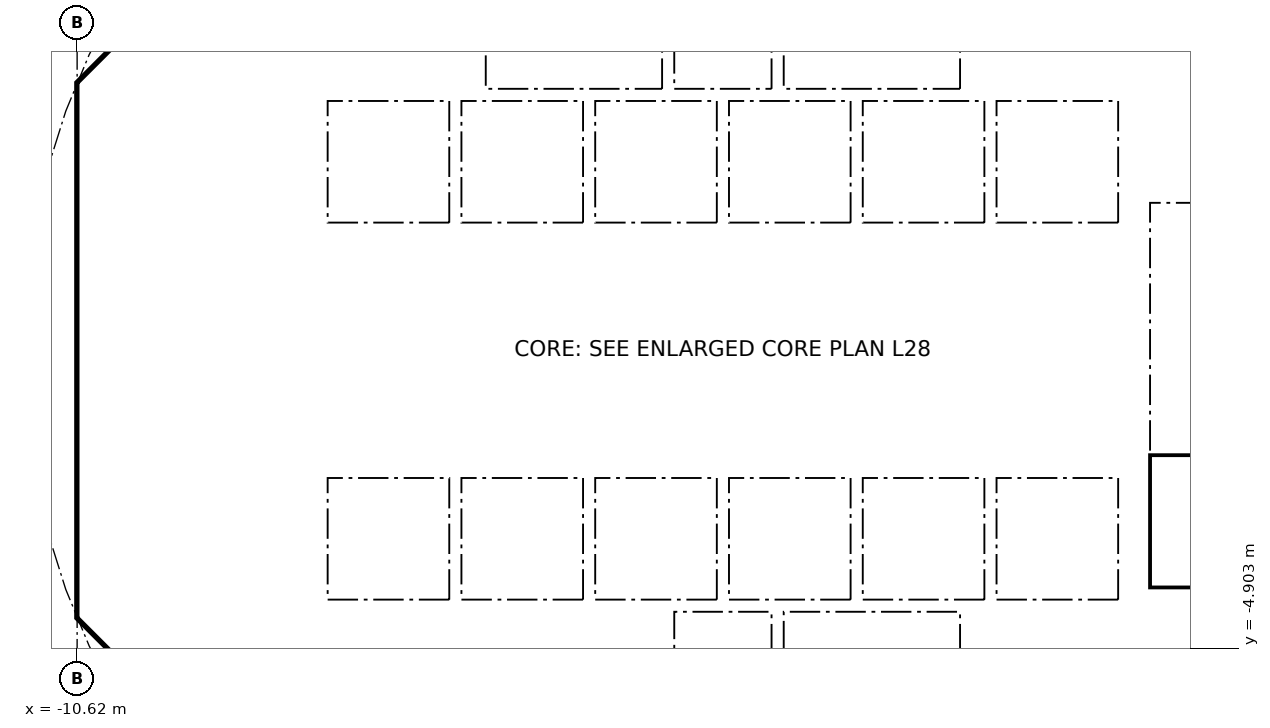
"""IFC4 building model, lengths in metres.
Left out: names, types, materials, properties, quantities, classifications, styles, units other than length and angle.
Written with IfcOpenShell. Run it as: python <this file> out.ifc"""

import sys

from ifc_helpers import new_model, si_unit, direction, frame, frame_2d, origin, place, context, subcontext, project, spatial, polyline, rectangle, outline, extrude, element, fill, save


model = new_model("IFC4")
c1 = context("Model", 3, precision=1e-05, world=origin(), true_north=direction((0.0, 1.0)))
c2 = subcontext(c1, "Body", "Model", "MODEL_VIEW")
j1 = project(units=[si_unit("LENGTHUNIT", "METRE"), si_unit("PLANEANGLEUNIT", "RADIAN")], contexts=[c1])
p1 = place(None, origin())
s1 = spatial("IfcSite", under=j1, at=p1, CompositionType="ELEMENT")
p2 = place(p1, origin())
s2 = spatial("IfcBuilding", under=s1, at=p2, CompositionType="ELEMENT")
p3 = place(p2, frame((0.0, 0.0, 114.0)))
s3 = spatial("IfcBuildingStorey", under=s2, at=p3, CompositionType="ELEMENT", Elevation=114.0)
p4 = place(p3, frame((9.988, 4.613, 0.0), z_axis=(0.0, 0.0, 1.0), x_axis=(-0.707106781187, 0.707106781187, 0.0)))
e1 = element("IfcWall", 1, at=p4, inside=s3, PredefinedType="SHEAR", context=c2, shape_type="SweptSolid", body=[
    extrude(rectangle(XDim=7.602, YDim=0.6, at=frame_2d((3.801, 0.0))), origin(), (0.0, 0.0, 1.0), 5.34),
])
p5 = place(p4, frame((3.201, 0.0, 0.0)))
e2 = element("IfcOpeningElement", 2, at=p5, cuts=e1, PredefinedType="OPENING", context=c2, shape_type="SweptSolid", body=[
    extrude(rectangle(XDim=1.2, YDim=2.1, at=frame_2d((0.6, 1.05))), frame((0.0, 0.31, 0.0), z_axis=(0.0, -1.0, 0.0), x_axis=(1.0, 0.0, 0.0)), (0.0, 0.0, 1.0), 0.62),
])
p6 = place(p3, frame((-4.613, 9.988, 0.0), z_axis=(0.0, 0.0, 1.0), x_axis=(-0.707106781187, -0.707106781187, 0.0)))
e3 = element("IfcWall", 3, at=p6, inside=s3, PredefinedType="SHEAR", context=c2, shape_type="SweptSolid", body=[
    extrude(rectangle(XDim=7.602, YDim=0.6, at=frame_2d((3.801, 0.0))), origin(), (0.0, 0.0, 1.0), 5.34),
])
p7 = place(p6, frame((0.351, 0.0, 0.0)))
e4 = element("IfcOpeningElement", 4, at=p7, cuts=e3, PredefinedType="OPENING", context=c2, shape_type="SweptSolid", body=[
    extrude(rectangle(XDim=1.1, YDim=2.1, at=frame_2d((0.55, 1.05))), frame((0.0, 0.31, 0.0), z_axis=(0.0, -1.0, 0.0), x_axis=(1.0, 0.0, 0.0)), (0.0, 0.0, 1.0), 0.62),
])
p8 = place(p3, frame((-10.325, 3.801, 0.0), z_axis=(0.0, 0.0, 1.0), x_axis=(0.0, -1.0, 0.0)))
e5 = element("IfcWall", 5, at=p8, inside=s3, PredefinedType="SHEAR", context=c2, shape_type="SweptSolid", body=[
    extrude(rectangle(XDim=7.602, YDim=0.6, at=frame_2d((3.801, 0.0))), origin(), (0.0, 0.0, 1.0), 5.34),
])
p9 = place(p8, frame((0.651, 0.0, 0.0)))
e6 = element("IfcOpeningElement", 6, at=p9, cuts=e5, PredefinedType="OPENING", context=c2, shape_type="SweptSolid", body=[
    extrude(rectangle(XDim=1.5, YDim=2.1, at=frame_2d((0.75, 1.05))), frame((0.0, 0.31, 0.0), z_axis=(0.0, -1.0, 0.0), x_axis=(1.0, 0.0, 0.0)), (0.0, 0.0, 1.0), 0.62),
])
p10 = place(p8, frame((5.451, 0.0, 0.0)))
e7 = element("IfcOpeningElement", 7, at=p10, cuts=e5, PredefinedType="OPENING", context=c2, shape_type="SweptSolid", body=[
    extrude(rectangle(XDim=1.5, YDim=2.1, at=frame_2d((0.75, 1.05))), frame((0.0, 0.31, 0.0), z_axis=(0.0, -1.0, 0.0), x_axis=(1.0, 0.0, 0.0)), (0.0, 0.0, 1.0), 0.62),
])
p11 = place(p3, frame((-9.988, -4.613, 0.0), z_axis=(0.0, 0.0, 1.0), x_axis=(0.707106781187, -0.707106781187, 0.0)))
e8 = element("IfcWall", 8, at=p11, inside=s3, PredefinedType="SHEAR", context=c2, shape_type="SweptSolid", body=[
    extrude(rectangle(XDim=7.602, YDim=0.6, at=frame_2d((3.801, 0.0))), origin(), (0.0, 0.0, 1.0), 5.34),
])
p12 = place(p11, frame((6.151, 0.0, 0.0)))
e9 = element("IfcOpeningElement", 9, at=p12, cuts=e8, PredefinedType="OPENING", context=c2, shape_type="SweptSolid", body=[
    extrude(rectangle(XDim=1.1, YDim=2.1, at=frame_2d((0.55, 1.05))), frame((0.0, 0.31, 0.0), z_axis=(0.0, -1.0, 0.0), x_axis=(1.0, 0.0, 0.0)), (0.0, 0.0, 1.0), 0.62),
])
p13 = place(p3, frame((4.613, -9.988, 0.0), z_axis=(0.0, 0.0, 1.0), x_axis=(0.707106781187, 0.707106781187, 0.0)))
e10 = element("IfcWall", 10, at=p13, inside=s3, PredefinedType="SHEAR", context=c2, shape_type="SweptSolid", body=[
    extrude(rectangle(XDim=7.602, YDim=0.6, at=frame_2d((3.801, 0.0))), origin(), (0.0, 0.0, 1.0), 5.34),
])
p14 = place(p13, frame((3.201, 0.0, 0.0)))
e11 = element("IfcOpeningElement", 11, at=p14, cuts=e10, PredefinedType="OPENING", context=c2, shape_type="SweptSolid", body=[
    extrude(rectangle(XDim=1.2, YDim=2.1, at=frame_2d((0.6, 1.05))), frame((0.0, 0.31, 0.0), z_axis=(0.0, -1.0, 0.0), x_axis=(1.0, 0.0, 0.0)), (0.0, 0.0, 1.0), 0.62),
])
p15 = place(p3, frame((-5.8, 4.3, 0.0), z_axis=(0.0, 0.0, 1.0), x_axis=(0.0, 1.0, 0.0)))
e12 = element("IfcWall", 12, at=p15, inside=s3, PredefinedType="PARTITIONING", context=c2, shape_type="SweptSolid", body=[
    extrude(rectangle(XDim=3.927, YDim=0.15, at=frame_2d((1.963, 0.0))), origin(), (0.0, 0.0, 1.0), 5.34),
])
p16 = place(p15, frame((1.551, 0.0, 0.0)))
e13 = element("IfcOpeningElement", 13, at=p16, cuts=e12, PredefinedType="OPENING", context=c2, shape_type="SweptSolid", body=[
    extrude(rectangle(XDim=0.9, YDim=2.1, at=frame_2d((0.45, 1.05))), frame((0.0, 0.085, 0.0), z_axis=(0.0, -1.0, 0.0), x_axis=(1.0, 0.0, 0.0)), (0.0, 0.0, 1.0), 0.17),
])
p17 = place(p3, frame((4.0, 4.3, 0.0), z_axis=(0.0, 0.0, 1.0), x_axis=(0.0, 1.0, 0.0)))
e14 = element("IfcWall", 14, at=p17, inside=s3, PredefinedType="SOLIDWALL", context=c2, shape_type="SweptSolid", body=[
    extrude(rectangle(XDim=2.2, YDim=0.2, at=frame_2d((1.1, 0.0))), origin(), (0.0, 0.0, 1.0), 5.34),
])
p18 = place(p17, frame((0.55, 0.0, 0.0)))
e15 = element("IfcOpeningElement", 15, at=p18, cuts=e14, PredefinedType="OPENING", context=c2, shape_type="SweptSolid", body=[
    extrude(rectangle(XDim=1.1, YDim=2.1, at=frame_2d((0.55, 1.05))), frame((0.0, 0.11, 0.0), z_axis=(0.0, -1.0, 0.0), x_axis=(1.0, 0.0, 0.0)), (0.0, 0.0, 1.0), 0.22),
])
p19 = place(p3, frame((-4.0, 4.3, 0.0), z_axis=(0.0, 0.0, 1.0), x_axis=(0.0, 1.0, 0.0)))
e16 = element("IfcWall", 16, at=p19, inside=s3, PredefinedType="SOLIDWALL", context=c2, shape_type="SweptSolid", body=[
    extrude(rectangle(XDim=2.2, YDim=0.2, at=frame_2d((1.1, 0.0))), origin(), (0.0, 0.0, 1.0), 5.34),
])
p20 = place(p19, frame((0.55, 0.0, 0.0)))
e17 = element("IfcOpeningElement", 17, at=p20, cuts=e16, PredefinedType="OPENING", context=c2, shape_type="SweptSolid", body=[
    extrude(rectangle(XDim=1.1, YDim=2.1, at=frame_2d((0.55, 1.05))), frame((0.0, 0.11, 0.0), z_axis=(0.0, -1.0, 0.0), x_axis=(1.0, 0.0, 0.0)), (0.0, 0.0, 1.0), 0.22),
])
p21 = place(p3, frame((-6.7, 2.0, 0.0), z_axis=(0.0, 0.0, 1.0), x_axis=(1.0, 0.0, 0.0)))
e18 = element("IfcWall", 18, at=p21, inside=s3, PredefinedType="SOLIDWALL", context=c2, shape_type="SweptSolid", body=[
    extrude(rectangle(XDim=13.4, YDim=0.2, at=frame_2d((6.7, 0.0))), origin(), (0.0, 0.0, 1.0), 5.34),
])
p22 = place(p21, frame((0.65, 0.0, 0.0)))
e19 = element("IfcOpeningElement", 19, at=p22, cuts=e18, PredefinedType="OPENING", context=c2, shape_type="SweptSolid", body=[
    extrude(rectangle(XDim=1.1, YDim=2.1, at=frame_2d((0.55, 1.05))), frame((0.0, 0.11, 0.0), z_axis=(0.0, -1.0, 0.0), x_axis=(1.0, 0.0, 0.0)), (0.0, 0.0, 1.0), 0.22),
])
p23 = place(p21, frame((2.85, 0.0, 0.0)))
e20 = element("IfcOpeningElement", 20, at=p23, cuts=e18, PredefinedType="OPENING", context=c2, shape_type="SweptSolid", body=[
    extrude(rectangle(XDim=1.1, YDim=2.1, at=frame_2d((0.55, 1.05))), frame((0.0, 0.11, 0.0), z_axis=(0.0, -1.0, 0.0), x_axis=(1.0, 0.0, 0.0)), (0.0, 0.0, 1.0), 0.22),
])
p24 = place(p21, frame((5.05, 0.0, 0.0)))
e21 = element("IfcOpeningElement", 21, at=p24, cuts=e18, PredefinedType="OPENING", context=c2, shape_type="SweptSolid", body=[
    extrude(rectangle(XDim=1.1, YDim=2.1, at=frame_2d((0.55, 1.05))), frame((0.0, 0.11, 0.0), z_axis=(0.0, -1.0, 0.0), x_axis=(1.0, 0.0, 0.0)), (0.0, 0.0, 1.0), 0.22),
])
p25 = place(p3, frame((6.7, 4.0, 0.0), z_axis=(0.0, 0.0, 1.0), x_axis=(1.0, 0.0, 0.0)))
e22 = element("IfcWall", 22, at=p25, inside=s3, PredefinedType="SOLIDWALL", context=c2, shape_type="SweptSolid", body=[
    extrude(rectangle(XDim=3.325, YDim=0.2, at=frame_2d((1.662, 0.0))), origin(), (0.0, 0.0, 1.0), 5.34),
])
p26 = place(p25, frame((1.25, 0.0, 0.0)))
e23 = element("IfcOpeningElement", 23, at=p26, cuts=e22, PredefinedType="OPENING", context=c2, shape_type="SweptSolid", body=[
    extrude(rectangle(XDim=1.1, YDim=2.1, at=frame_2d((0.55, 1.05))), frame((0.0, 0.11, 0.0), z_axis=(0.0, -1.0, 0.0), x_axis=(1.0, 0.0, 0.0)), (0.0, 0.0, 1.0), 0.22),
])
p27 = place(p3, frame((-5.8, -8.227, 0.0), z_axis=(0.0, 0.0, 1.0), x_axis=(0.0, 1.0, 0.0)))
e24 = element("IfcWall", 24, at=p27, inside=s3, PredefinedType="PARTITIONING", context=c2, shape_type="SweptSolid", body=[
    extrude(rectangle(XDim=3.927, YDim=0.15, at=frame_2d((1.963, 0.0))), origin(), (0.0, 0.0, 1.0), 5.34),
])
p28 = place(p27, frame((1.476, 0.0, 0.0)))
e25 = element("IfcOpeningElement", 25, at=p28, cuts=e24, PredefinedType="OPENING", context=c2, shape_type="SweptSolid", body=[
    extrude(rectangle(XDim=0.9, YDim=2.1, at=frame_2d((0.45, 1.05))), frame((0.0, 0.085, 0.0), z_axis=(0.0, -1.0, 0.0), x_axis=(1.0, 0.0, 0.0)), (0.0, 0.0, 1.0), 0.17),
])
p29 = place(p3, frame((4.0, -6.5, 0.0), z_axis=(0.0, 0.0, 1.0), x_axis=(0.0, 1.0, 0.0)))
e26 = element("IfcWall", 26, at=p29, inside=s3, PredefinedType="SOLIDWALL", context=c2, shape_type="SweptSolid", body=[
    extrude(rectangle(XDim=2.2, YDim=0.2, at=frame_2d((1.1, 0.0))), origin(), (0.0, 0.0, 1.0), 5.34),
])
p30 = place(p29, frame((0.55, 0.0, 0.0)))
e27 = element("IfcOpeningElement", 27, at=p30, cuts=e26, PredefinedType="OPENING", context=c2, shape_type="SweptSolid", body=[
    extrude(rectangle(XDim=1.1, YDim=2.1, at=frame_2d((0.55, 1.05))), frame((0.0, 0.11, 0.0), z_axis=(0.0, -1.0, 0.0), x_axis=(1.0, 0.0, 0.0)), (0.0, 0.0, 1.0), 0.22),
])
p31 = place(p3, frame((-4.0, -6.5, 0.0), z_axis=(0.0, 0.0, 1.0), x_axis=(0.0, 1.0, 0.0)))
e28 = element("IfcWall", 28, at=p31, inside=s3, PredefinedType="SOLIDWALL", context=c2, shape_type="SweptSolid", body=[
    extrude(rectangle(XDim=2.2, YDim=0.2, at=frame_2d((1.1, 0.0))), origin(), (0.0, 0.0, 1.0), 5.34),
])
p32 = place(p31, frame((0.65, 0.0, 0.0)))
e29 = element("IfcOpeningElement", 29, at=p32, cuts=e28, PredefinedType="OPENING", context=c2, shape_type="SweptSolid", body=[
    extrude(rectangle(XDim=0.9, YDim=2.1, at=frame_2d((0.45, 1.05))), frame((0.0, 0.11, 0.0), z_axis=(0.0, -1.0, 0.0), x_axis=(1.0, 0.0, 0.0)), (0.0, 0.0, 1.0), 0.22),
])
p33 = place(p3, frame((-6.7, -2.0, 0.0), z_axis=(0.0, 0.0, 1.0), x_axis=(1.0, 0.0, 0.0)))
e30 = element("IfcWall", 30, at=p33, inside=s3, PredefinedType="SOLIDWALL", context=c2, shape_type="SweptSolid", body=[
    extrude(rectangle(XDim=13.4, YDim=0.2, at=frame_2d((6.7, 0.0))), origin(), (0.0, 0.0, 1.0), 5.34),
])
p34 = place(p33, frame((0.65, 0.0, 0.0)))
e31 = element("IfcOpeningElement", 31, at=p34, cuts=e30, PredefinedType="OPENING", context=c2, shape_type="SweptSolid", body=[
    extrude(rectangle(XDim=1.1, YDim=2.1, at=frame_2d((0.55, 1.05))), frame((0.0, 0.11, 0.0), z_axis=(0.0, -1.0, 0.0), x_axis=(1.0, 0.0, 0.0)), (0.0, 0.0, 1.0), 0.22),
])
p35 = place(p33, frame((2.85, 0.0, 0.0)))
e32 = element("IfcOpeningElement", 32, at=p35, cuts=e30, PredefinedType="OPENING", context=c2, shape_type="SweptSolid", body=[
    extrude(rectangle(XDim=1.1, YDim=2.1, at=frame_2d((0.55, 1.05))), frame((0.0, 0.11, 0.0), z_axis=(0.0, -1.0, 0.0), x_axis=(1.0, 0.0, 0.0)), (0.0, 0.0, 1.0), 0.22),
])
p36 = place(p3, origin())
e33 = element("IfcWall", 33, at=p36, inside=s3, PredefinedType="SHEAR", context=c2, shape_type="SweptSolid", body=[
    extrude(outline(polyline([(-10.625, -3.801), (-10.025, -3.801), (-10.025, -4.152), (-9.776, -4.401), (-10.2, -4.825), (-10.625, -4.401), (-10.625, -3.801)])), origin(), (0.0, 0.0, 1.0), 5.34),
])
p37 = place(p3, origin())
e34 = element("IfcWall", 34, at=p37, inside=s3, PredefinedType="SHEAR", context=c2, shape_type="SweptSolid", body=[
    extrude(outline(polyline([(-10.2, 4.825), (-9.776, 4.401), (-10.025, 4.152), (-10.025, 3.801), (-10.625, 3.801), (-10.625, 4.401), (-10.2, 4.825)])), origin(), (0.0, 0.0, 1.0), 5.34),
])
for number, where, z_axis, x_axis in (
    (35, (-0.9, -6.5, 0.0), (0.0, 0.0, 1.0), (0.0, 1.0, 0.0)),
    (36, (0.9, -6.5, 0.0), (0.0, 0.0, 1.0), (0.0, 1.0, 0.0)),
):
    element("IfcWall", number, at=place(p3, frame(where, z_axis=z_axis, x_axis=x_axis)), inside=s3, PredefinedType="SOLIDWALL", context=c2, shape_type="SweptSolid", body=[
        extrude(rectangle(XDim=2.2, YDim=0.2, at=frame_2d((1.1, 0.0))), origin(), (0.0, 0.0, 1.0), 5.34),
    ])
p38 = place(p3, origin())
e37 = element("IfcWall", 37, at=p38, inside=s3, PredefinedType="SOLIDWALL", context=c2, shape_type="SweptSolid", body=[
    extrude(outline(polyline([(-6.7, -2.1), (-6.5, -2.1), (-6.5, -4.1), (-4.5, -4.1), (-4.5, -2.1), (-4.3, -2.1), (-4.3, -4.1), (-2.3, -4.1), (-2.3, -2.1), (-2.1, -2.1), (-2.1, -4.1), (-0.1, -4.1), (-0.1, -2.1), (0.1, -2.1), (0.1, -4.1), (2.1, -4.1), (2.1, -2.1), (2.3, -2.1), (2.3, -4.1), (4.3, -4.1), (4.3, -2.1), (4.5, -2.1), (4.5, -4.1), (6.5, -4.1), (6.5, -2.1), (6.7, -2.1), (6.7, -4.3), (-6.7, -4.3), (-6.7, -2.1)])), origin(), (0.0, 0.0, 1.0), 5.34),
])
for number, where, z_axis, x_axis in (
    (38, (-0.9, 4.3, 0.0), (0.0, 0.0, 1.0), (0.0, 1.0, 0.0)),
    (39, (0.9, 4.3, 0.0), (0.0, 0.0, 1.0), (0.0, 1.0, 0.0)),
):
    element("IfcWall", number, at=place(p3, frame(where, z_axis=z_axis, x_axis=x_axis)), inside=s3, PredefinedType="SOLIDWALL", context=c2, shape_type="SweptSolid", body=[
        extrude(rectangle(XDim=2.2, YDim=0.2, at=frame_2d((1.1, 0.0))), origin(), (0.0, 0.0, 1.0), 5.34),
    ])
p39 = place(p3, origin())
e40 = element("IfcWall", 40, at=p39, inside=s3, PredefinedType="SOLIDWALL", context=c2, shape_type="SweptSolid", body=[
    extrude(outline(polyline([(-6.5, 2.1), (-6.7, 2.1), (-6.7, 4.3), (6.7, 4.3), (6.7, 2.1), (6.5, 2.1), (6.5, 4.1), (4.5, 4.1), (4.5, 2.1), (4.3, 2.1), (4.3, 4.1), (2.3, 4.1), (2.3, 2.1), (2.1, 2.1), (2.1, 4.1), (0.1, 4.1), (0.1, 2.1), (-0.1, 2.1), (-0.1, 4.1), (-2.1, 4.1), (-2.1, 2.1), (-2.3, 2.1), (-2.3, 4.1), (-4.3, 4.1), (-4.3, 2.1), (-4.5, 2.1), (-4.5, 4.1), (-6.5, 4.1), (-6.5, 2.1)])), origin(), (0.0, 0.0, 1.0), 5.34),
])
for number, where, z_axis, x_axis in (
    (41, (-10.025, -4.0, 0.0), (0.0, 0.0, 1.0), (1.0, 0.0, 0.0)),
    (42, (-10.025, 4.0, 0.0), (0.0, 0.0, 1.0), (1.0, 0.0, 0.0)),
):
    element("IfcWall", number, at=place(p3, frame(where, z_axis=z_axis, x_axis=x_axis)), inside=s3, PredefinedType="PARTITIONING", context=c2, shape_type="SweptSolid", body=[
        extrude(rectangle(XDim=3.325, YDim=0.2, at=frame_2d((1.662, 0.0))), origin(), (0.0, 0.0, 1.0), 5.34),
    ])
p40 = place(p3, origin())
e43 = element("IfcWall", 43, at=p40, inside=s3, PredefinedType="SOLIDWALL", context=c2, shape_type="SweptSolid", body=[
    extrude(outline(polyline([(7.025, -3.9), (6.7, -3.9), (6.7, 3.9), (7.025, 3.9), (7.025, -3.9)])), origin(), (0.0, 0.0, 1.0), 5.34),
])
p41 = place(p3, origin())
e44 = element("IfcWall", 44, at=p41, inside=s3, PredefinedType="SOLIDWALL", context=c2, shape_type="SweptSolid", body=[
    extrude(outline(polyline([(10.025, -4.1), (6.7, -4.1), (6.7, -3.9), (10.025, -3.9), (10.025, -4.1)])), origin(), (0.0, 0.0, 1.0), 5.34),
])
p42 = place(p22, origin())
e45 = element("IfcDoor", 45, at=p42, inside=s3, OperationType="DOUBLE_DOOR_SLIDING", PredefinedType="DOOR", context=c2, shape_type="SweptSolid", body=[
    extrude(rectangle(XDim=1.1, YDim=2.1, at=frame_2d((0.55, 1.05))), frame((0.0, 0.025, 0.0), z_axis=(0.0, -1.0, 0.0), x_axis=(1.0, 0.0, 0.0)), (0.0, 0.0, 1.0), 0.05),
])
fill(e19, e45)
p43 = place(p23, origin())
e46 = element("IfcDoor", 46, at=p43, inside=s3, OperationType="DOUBLE_DOOR_SLIDING", PredefinedType="DOOR", context=c2, shape_type="SweptSolid", body=[
    extrude(rectangle(XDim=1.1, YDim=2.1, at=frame_2d((0.55, 1.05))), frame((0.0, 0.025, 0.0), z_axis=(0.0, -1.0, 0.0), x_axis=(1.0, 0.0, 0.0)), (0.0, 0.0, 1.0), 0.05),
])
fill(e20, e46)
p44 = place(p24, origin())
e47 = element("IfcDoor", 47, at=p44, inside=s3, OperationType="DOUBLE_DOOR_SLIDING", PredefinedType="DOOR", context=c2, shape_type="SweptSolid", body=[
    extrude(rectangle(XDim=1.1, YDim=2.1, at=frame_2d((0.55, 1.05))), frame((0.0, 0.025, 0.0), z_axis=(0.0, -1.0, 0.0), x_axis=(1.0, 0.0, 0.0)), (0.0, 0.0, 1.0), 0.05),
])
fill(e21, e47)
p45 = place(p34, origin())
e48 = element("IfcDoor", 48, at=p45, inside=s3, OperationType="DOUBLE_DOOR_SLIDING", PredefinedType="DOOR", context=c2, shape_type="SweptSolid", body=[
    extrude(rectangle(XDim=1.1, YDim=2.1, at=frame_2d((0.55, 1.05))), frame((0.0, 0.025, 0.0), z_axis=(0.0, -1.0, 0.0), x_axis=(1.0, 0.0, 0.0)), (0.0, 0.0, 1.0), 0.05),
])
fill(e31, e48)
p46 = place(p35, origin())
e49 = element("IfcDoor", 49, at=p46, inside=s3, OperationType="DOUBLE_DOOR_SLIDING", PredefinedType="DOOR", context=c2, shape_type="SweptSolid", body=[
    extrude(rectangle(XDim=1.1, YDim=2.1, at=frame_2d((0.55, 1.05))), frame((0.0, 0.025, 0.0), z_axis=(0.0, -1.0, 0.0), x_axis=(1.0, 0.0, 0.0)), (0.0, 0.0, 1.0), 0.05),
])
fill(e32, e49)
p47 = place(p18, origin())
e50 = element("IfcDoor", 50, at=p47, inside=s3, OperationType="DOUBLE_DOOR_SLIDING", PredefinedType="DOOR", context=c2, shape_type="SweptSolid", body=[
    extrude(rectangle(XDim=1.1, YDim=2.1, at=frame_2d((0.55, 1.05))), frame((0.0, 0.025, 0.0), z_axis=(0.0, -1.0, 0.0), x_axis=(1.0, 0.0, 0.0)), (0.0, 0.0, 1.0), 0.05),
])
fill(e15, e50)
p48 = place(p30, origin())
e51 = element("IfcDoor", 51, at=p48, inside=s3, OperationType="DOUBLE_DOOR_SLIDING", PredefinedType="DOOR", context=c2, shape_type="SweptSolid", body=[
    extrude(rectangle(XDim=1.1, YDim=2.1, at=frame_2d((0.55, 1.05))), frame((0.0, 0.025, 0.0), z_axis=(0.0, -1.0, 0.0), x_axis=(1.0, 0.0, 0.0)), (0.0, 0.0, 1.0), 0.05),
])
fill(e27, e51)
p49 = place(p20, origin())
e52 = element("IfcDoor", 52, at=p49, inside=s3, OperationType="DOUBLE_DOOR_SLIDING", PredefinedType="DOOR", context=c2, shape_type="SweptSolid", body=[
    extrude(rectangle(XDim=1.1, YDim=2.1, at=frame_2d((0.55, 1.05))), frame((0.0, 0.025, 0.0), z_axis=(0.0, -1.0, 0.0), x_axis=(1.0, 0.0, 0.0)), (0.0, 0.0, 1.0), 0.05),
])
fill(e17, e52)
p50 = place(p9, origin())
e53 = element("IfcDoor", 53, at=p50, inside=s3, OperationType="DOUBLE_DOOR_SINGLE_SWING", PredefinedType="DOOR", context=c2, shape_type="SweptSolid", body=[
    extrude(rectangle(XDim=1.5, YDim=2.1, at=frame_2d((0.75, 1.05))), frame((0.0, 0.025, 0.0), z_axis=(0.0, -1.0, 0.0), x_axis=(1.0, 0.0, 0.0)), (0.0, 0.0, 1.0), 0.05),
])
fill(e6, e53)
p51 = place(p10, origin())
e54 = element("IfcDoor", 54, at=p51, inside=s3, OperationType="DOUBLE_DOOR_SINGLE_SWING", PredefinedType="DOOR", context=c2, shape_type="SweptSolid", body=[
    extrude(rectangle(XDim=1.5, YDim=2.1, at=frame_2d((0.75, 1.05))), frame((0.0, 0.025, 0.0), z_axis=(0.0, -1.0, 0.0), x_axis=(1.0, 0.0, 0.0)), (0.0, 0.0, 1.0), 0.05),
])
fill(e7, e54)
save(model, sys.argv[1])
